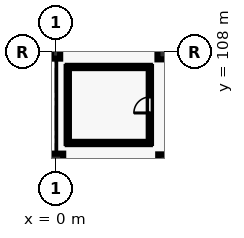
"""IFC4 building model, lengths in metres.
Left out: names, types, materials, properties, quantities, classifications, styles, units other than length and angle.
Written with IfcOpenShell. Run it as: python <this file> out.ifc"""

import sys

from ifc_helpers import new_model, si_unit, direction, frame, frame_2d, origin, origin_2d, place, context, subcontext, project, spatial, rectangle, circle, extrude, element, fill, save


model = new_model("IFC4")
c1 = context("Model", 3, precision=1e-05, world=origin(), true_north=direction((0.0, 1.0)))
c2 = subcontext(c1, "Body", "Model", "MODEL_VIEW")
j1 = project(units=[si_unit("LENGTHUNIT", "METRE"), si_unit("PLANEANGLEUNIT", "RADIAN")], contexts=[c1])
p1 = place(None, origin())
s1 = spatial("IfcSite", under=j1, at=p1, CompositionType="ELEMENT")
p2 = place(p1, origin())
s2 = spatial("IfcBuilding", under=s1, at=p2, CompositionType="ELEMENT")
p3 = place(p2, origin())
s3 = spatial("IfcBuildingStorey", under=s2, at=p3, CompositionType="ELEMENT", Elevation=0.0)
p4 = place(p3, frame((0.0, 100.8, 0.0), z_axis=(0.0, 0.0, 1.0), x_axis=(1.0, 0.0, 0.0)))
e1 = element("IfcColumn", 1, at=p4, inside=s3, PredefinedType="COLUMN", context=c2, shape_type="SweptSolid", body=[
    extrude(circle(Radius=0.5, at=origin_2d()), origin(), (0.0, 0.0, 1.0), 5.4),
])
p5 = place(p3, frame((0.0, 108.0, 0.0), z_axis=(0.0, 0.0, 1.0), x_axis=(1.0, 0.0, 0.0)))
e2 = element("IfcColumn", 2, at=p5, inside=s3, PredefinedType="COLUMN", context=c2, shape_type="SweptSolid", body=[
    extrude(rectangle(XDim=0.6, YDim=0.9, at=origin_2d()), origin(), (0.0, 0.0, 1.0), 5.4),
])
p6 = place(p3, frame((7.2, 100.8, 0.0), z_axis=(0.0, 0.0, 1.0), x_axis=(1.0, 0.0, 0.0)))
e3 = element("IfcColumn", 3, at=p6, inside=s3, PredefinedType="COLUMN", context=c2, shape_type="SweptSolid", body=[
    extrude(rectangle(XDim=0.9, YDim=0.9, at=origin_2d()), origin(), (0.0, 0.0, 1.0), 5.4),
])
p7 = place(p3, frame((7.2, 108.0, 0.0), z_axis=(0.0, 0.0, 1.0), x_axis=(1.0, 0.0, 0.0)))
e4 = element("IfcColumn", 4, at=p7, inside=s3, PredefinedType="COLUMN", context=c2, shape_type="SweptSolid", body=[
    extrude(circle(Radius=0.5, at=origin_2d()), origin(), (0.0, 0.0, 1.0), 5.4),
])
p8 = place(p3, frame((0.8, 102.0, 0.0), z_axis=(0.0, 0.0, 1.0), x_axis=(1.0, 0.0, 0.0)))
e5 = element("IfcWall", 5, at=p8, inside=s3, PredefinedType="PARTITIONING", context=c2, shape_type="SweptSolid", body=[
    extrude(rectangle(XDim=5.4, YDim=0.15, at=frame_2d((2.7, 0.0))), origin(), (0.0, 0.0, 1.0), 4.1),
])
p9 = place(p3, frame((6.2, 102.0, 0.0), z_axis=(0.0, 0.0, 1.0), x_axis=(0.0, 1.0, 0.0)))
e6 = element("IfcWall", 6, at=p9, inside=s3, PredefinedType="PARTITIONING", context=c2, shape_type="SweptSolid", body=[
    extrude(rectangle(XDim=5.0, YDim=0.15, at=frame_2d((2.5, 0.0))), origin(), (0.0, 0.0, 1.0), 4.1),
])
p10 = place(p9, frame((1.975, 0.0, 0.0)))
e7 = element("IfcOpeningElement", 7, at=p10, cuts=e6, PredefinedType="OPENING", context=c2, shape_type="SweptSolid", body=[
    extrude(rectangle(XDim=1.05, YDim=2.2, at=frame_2d((0.525, 1.1))), frame((0.0, 0.085, 0.0), z_axis=(0.0, -1.0, 0.0), x_axis=(1.0, 0.0, 0.0)), (0.0, 0.0, 1.0), 0.17),
])
p11 = place(p3, frame((6.2, 107.0, 0.0), z_axis=(0.0, 0.0, 1.0), x_axis=(-1.0, 0.0, 0.0)))
e8 = element("IfcWall", 8, at=p11, inside=s3, PredefinedType="PARTITIONING", context=c2, shape_type="SweptSolid", body=[
    extrude(rectangle(XDim=5.4, YDim=0.15, at=frame_2d((2.7, 0.0))), origin(), (0.0, 0.0, 1.0), 4.1),
])
p12 = place(p3, frame((0.8, 107.0, 0.0), z_axis=(0.0, 0.0, 1.0), x_axis=(0.0, -1.0, 0.0)))
e9 = element("IfcWall", 9, at=p12, inside=s3, PredefinedType="PARTITIONING", context=c2, shape_type="SweptSolid", body=[
    extrude(rectangle(XDim=5.0, YDim=0.15, at=frame_2d((2.5, 0.0))), origin(), (0.0, 0.0, 1.0), 4.1),
])
p13 = place(p10, origin())
e10 = element("IfcDoor", 10, at=p13, inside=s3, OperationType="SINGLE_SWING_LEFT", PredefinedType="DOOR", context=c2, shape_type="SweptSolid", body=[
    extrude(rectangle(XDim=1.05, YDim=2.2, at=frame_2d((0.525, 1.1))), frame((0.0, 0.025, 0.0), z_axis=(0.0, -1.0, 0.0), x_axis=(1.0, 0.0, 0.0)), (0.0, 0.0, 1.0), 0.05),
])
fill(e7, e10)
save(model, sys.argv[1])
